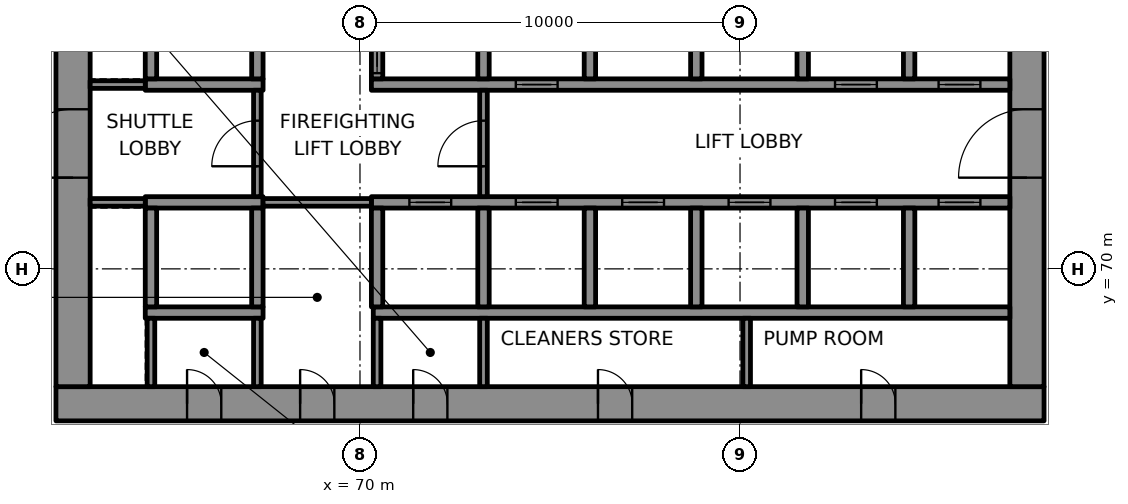
"""IFC4 building model, lengths in metres.
Left out: names, types, materials, properties, quantities, classifications, styles, units other than length and angle.
Written with IfcOpenShell. Run it as: python <this file> out.ifc"""

import sys

from ifc_helpers import new_model, si_unit, direction, frame, frame_2d, origin, place, context, subcontext, project, spatial, rectangle, extrude, element, fill, save


model = new_model("IFC4")
c1 = context("Model", 3, precision=1e-05, world=origin(), true_north=direction((0.0, 1.0)))
c2 = subcontext(c1, "Body", "Model", "MODEL_VIEW")
j1 = project(units=[si_unit("LENGTHUNIT", "METRE"), si_unit("PLANEANGLEUNIT", "RADIAN")], contexts=[c1])
p1 = place(None, origin())
s1 = spatial("IfcSite", under=j1, at=p1, CompositionType="ELEMENT")
p2 = place(p1, origin())
s2 = spatial("IfcBuilding", under=s1, at=p2, CompositionType="ELEMENT")
p3 = place(p2, frame((0.0, 0.0, 90.4)))
s3 = spatial("IfcBuildingStorey", under=s2, at=p3, CompositionType="ELEMENT", Elevation=90.4)
p4 = place(p3, frame((62.0, 66.45, 0.0), z_axis=(0.0, 0.0, 1.0), x_axis=(1.0, 0.0, 0.0)))
e1 = element("IfcWall", 1, at=p4, inside=s3, PredefinedType="SHEAR", context=c2, shape_type="SweptSolid", body=[
    extrude(rectangle(XDim=26.0, YDim=0.9, at=frame_2d((13.0, 0.0))), origin(), (0.0, 0.0, 1.0), 4.0),
])
p5 = place(p4, frame((3.45, 0.0, 0.0)))
e2 = element("IfcOpeningElement", 2, at=p5, cuts=e1, PredefinedType="OPENING", context=c2, shape_type="SweptSolid", body=[
    extrude(rectangle(XDim=0.9, YDim=2.1, at=frame_2d((0.45, 1.05))), frame((0.0, 0.46, 0.0), z_axis=(0.0, -1.0, 0.0), x_axis=(1.0, 0.0, 0.0)), (0.0, 0.0, 1.0), 0.92),
])
p6 = place(p4, frame((6.425, 0.0, 0.0)))
e3 = element("IfcOpeningElement", 3, at=p6, cuts=e1, PredefinedType="OPENING", context=c2, shape_type="SweptSolid", body=[
    extrude(rectangle(XDim=0.9, YDim=2.1, at=frame_2d((0.45, 1.05))), frame((0.0, 0.46, 0.0), z_axis=(0.0, -1.0, 0.0), x_axis=(1.0, 0.0, 0.0)), (0.0, 0.0, 1.0), 0.92),
])
p7 = place(p4, frame((9.4, 0.0, 0.0)))
e4 = element("IfcOpeningElement", 4, at=p7, cuts=e1, PredefinedType="OPENING", context=c2, shape_type="SweptSolid", body=[
    extrude(rectangle(XDim=0.9, YDim=2.1, at=frame_2d((0.45, 1.05))), frame((0.0, 0.46, 0.0), z_axis=(0.0, -1.0, 0.0), x_axis=(1.0, 0.0, 0.0)), (0.0, 0.0, 1.0), 0.92),
])
p8 = place(p4, frame((14.262, 0.0, 0.0)))
e5 = element("IfcOpeningElement", 5, at=p8, cuts=e1, PredefinedType="OPENING", context=c2, shape_type="SweptSolid", body=[
    extrude(rectangle(XDim=0.9, YDim=2.1, at=frame_2d((0.45, 1.05))), frame((0.0, 0.46, 0.0), z_axis=(0.0, -1.0, 0.0), x_axis=(1.0, 0.0, 0.0)), (0.0, 0.0, 1.0), 0.92),
])
p9 = place(p4, frame((21.188, 0.0, 0.0)))
e6 = element("IfcOpeningElement", 6, at=p9, cuts=e1, PredefinedType="OPENING", context=c2, shape_type="SweptSolid", body=[
    extrude(rectangle(XDim=0.9, YDim=2.1, at=frame_2d((0.45, 1.05))), frame((0.0, 0.46, 0.0), z_axis=(0.0, -1.0, 0.0), x_axis=(1.0, 0.0, 0.0)), (0.0, 0.0, 1.0), 0.92),
])
p10 = place(p3, frame((62.45, 66.9, 0.0), z_axis=(0.0, 0.0, 1.0), x_axis=(0.0, 1.0, 0.0)))
e7 = element("IfcWall", 7, at=p10, inside=s3, PredefinedType="SHEAR", context=c2, shape_type="SweptSolid", body=[
    extrude(rectangle(XDim=16.2, YDim=0.9, at=frame_2d((8.1, 0.0))), origin(), (0.0, 0.0, 1.0), 4.0),
])
p11 = place(p10, frame((5.5, 0.0, 0.0)))
e8 = element("IfcOpeningElement", 8, at=p11, cuts=e7, PredefinedType="OPENING", context=c2, shape_type="SweptSolid", body=[
    extrude(rectangle(XDim=1.8, YDim=2.1, at=frame_2d((0.9, 1.05))), frame((0.0, 0.46, 0.0), z_axis=(0.0, -1.0, 0.0), x_axis=(1.0, 0.0, 0.0)), (0.0, 0.0, 1.0), 0.92),
])
p12 = place(p3, frame((87.55, 66.9, 0.0), z_axis=(0.0, 0.0, 1.0), x_axis=(0.0, 1.0, 0.0)))
e9 = element("IfcWall", 9, at=p12, inside=s3, PredefinedType="SHEAR", context=c2, shape_type="SweptSolid", body=[
    extrude(rectangle(XDim=16.2, YDim=0.9, at=frame_2d((8.1, 0.0))), origin(), (0.0, 0.0, 1.0), 4.0),
])
p13 = place(p12, frame((5.5, 0.0, 0.0)))
e10 = element("IfcOpeningElement", 10, at=p13, cuts=e9, PredefinedType="OPENING", context=c2, shape_type="SweptSolid", body=[
    extrude(rectangle(XDim=1.8, YDim=2.1, at=frame_2d((0.9, 1.05))), frame((0.0, 0.46, 0.0), z_axis=(0.0, -1.0, 0.0), x_axis=(1.0, 0.0, 0.0)), (0.0, 0.0, 1.0), 0.92),
])
p14 = place(p12, frame((11.738, 0.0, 0.0)))
e11 = element("IfcOpeningElement", 11, at=p14, cuts=e9, PredefinedType="OPENING", context=c2, shape_type="SweptSolid", body=[
    extrude(rectangle(XDim=0.9, YDim=2.1, at=frame_2d((0.45, 1.05))), frame((0.0, 0.46, 0.0), z_axis=(0.0, -1.0, 0.0), x_axis=(1.0, 0.0, 0.0)), (0.0, 0.0, 1.0), 0.92),
])
p15 = place(p3, frame((64.35, 68.85, 0.0), z_axis=(0.0, 0.0, 1.0), x_axis=(1.0, 0.0, 0.0)))
e12 = element("IfcWall", 12, at=p15, inside=s3, PredefinedType="SHEAR", context=c2, shape_type="SweptSolid", body=[
    extrude(rectangle(XDim=3.1, YDim=0.3, at=frame_2d((1.55, 0.0))), origin(), (0.0, 0.0, 1.0), 4.0),
])
p16 = place(p3, frame((70.35, 68.85, 0.0), z_axis=(0.0, 0.0, 1.0), x_axis=(1.0, 0.0, 0.0)))
e13 = element("IfcWall", 13, at=p16, inside=s3, PredefinedType="SHEAR", context=c2, shape_type="SweptSolid", body=[
    extrude(rectangle(XDim=16.75, YDim=0.3, at=frame_2d((8.375, 0.0))), origin(), (0.0, 0.0, 1.0), 4.0),
])
p17 = place(p3, frame((64.35, 71.75, 0.0), z_axis=(0.0, 0.0, 1.0), x_axis=(1.0, 0.0, 0.0)))
e14 = element("IfcWall", 14, at=p17, inside=s3, PredefinedType="SHEAR", context=c2, shape_type="SweptSolid", body=[
    extrude(rectangle(XDim=3.1, YDim=0.3, at=frame_2d((1.55, 0.0))), origin(), (0.0, 0.0, 1.0), 4.0),
])
p18 = place(p3, frame((70.3, 71.75, 0.0), z_axis=(0.0, 0.0, 1.0), x_axis=(1.0, 0.0, 0.0)))
e15 = element("IfcWall", 15, at=p18, inside=s3, PredefinedType="SHEAR", context=c2, shape_type="SweptSolid", body=[
    extrude(rectangle(XDim=16.8, YDim=0.3, at=frame_2d((8.4, 0.0))), origin(), (0.0, 0.0, 1.0), 4.0),
])
p19 = place(p18, frame((1.0, 0.0, 0.0)))
e16 = element("IfcOpeningElement", 16, at=p19, cuts=e15, PredefinedType="OPENING", context=c2, shape_type="SweptSolid", body=[
    extrude(rectangle(XDim=1.1, YDim=2.1, at=frame_2d((0.55, 1.05))), frame((0.0, 0.16, 0.0), z_axis=(0.0, -1.0, 0.0), x_axis=(1.0, 0.0, 0.0)), (0.0, 0.0, 1.0), 0.32),
])
p20 = place(p18, frame((3.8, 0.0, 0.0)))
e17 = element("IfcOpeningElement", 17, at=p20, cuts=e15, PredefinedType="OPENING", context=c2, shape_type="SweptSolid", body=[
    extrude(rectangle(XDim=1.1, YDim=2.1, at=frame_2d((0.55, 1.05))), frame((0.0, 0.16, 0.0), z_axis=(0.0, -1.0, 0.0), x_axis=(1.0, 0.0, 0.0)), (0.0, 0.0, 1.0), 0.32),
])
p21 = place(p18, frame((6.6, 0.0, 0.0)))
e18 = element("IfcOpeningElement", 18, at=p21, cuts=e15, PredefinedType="OPENING", context=c2, shape_type="SweptSolid", body=[
    extrude(rectangle(XDim=1.1, YDim=2.1, at=frame_2d((0.55, 1.05))), frame((0.0, 0.16, 0.0), z_axis=(0.0, -1.0, 0.0), x_axis=(1.0, 0.0, 0.0)), (0.0, 0.0, 1.0), 0.32),
])
p22 = place(p18, frame((9.4, 0.0, 0.0)))
e19 = element("IfcOpeningElement", 19, at=p22, cuts=e15, PredefinedType="OPENING", context=c2, shape_type="SweptSolid", body=[
    extrude(rectangle(XDim=1.1, YDim=2.1, at=frame_2d((0.55, 1.05))), frame((0.0, 0.16, 0.0), z_axis=(0.0, -1.0, 0.0), x_axis=(1.0, 0.0, 0.0)), (0.0, 0.0, 1.0), 0.32),
])
p23 = place(p18, frame((12.2, 0.0, 0.0)))
e20 = element("IfcOpeningElement", 20, at=p23, cuts=e15, PredefinedType="OPENING", context=c2, shape_type="SweptSolid", body=[
    extrude(rectangle(XDim=1.1, YDim=2.1, at=frame_2d((0.55, 1.05))), frame((0.0, 0.16, 0.0), z_axis=(0.0, -1.0, 0.0), x_axis=(1.0, 0.0, 0.0)), (0.0, 0.0, 1.0), 0.32),
])
p24 = place(p18, frame((14.925, 0.0, 0.0)))
e21 = element("IfcOpeningElement", 21, at=p24, cuts=e15, PredefinedType="OPENING", context=c2, shape_type="SweptSolid", body=[
    extrude(rectangle(XDim=1.1, YDim=2.1, at=frame_2d((0.55, 1.05))), frame((0.0, 0.16, 0.0), z_axis=(0.0, -1.0, 0.0), x_axis=(1.0, 0.0, 0.0)), (0.0, 0.0, 1.0), 0.32),
])
p25 = place(p3, frame((64.35, 74.85, 0.0), z_axis=(0.0, 0.0, 1.0), x_axis=(1.0, 0.0, 0.0)))
e22 = element("IfcWall", 22, at=p25, inside=s3, PredefinedType="SHEAR", context=c2, shape_type="SweptSolid", body=[
    extrude(rectangle(XDim=3.1, YDim=0.3, at=frame_2d((1.55, 0.0))), origin(), (0.0, 0.0, 1.0), 4.0),
])
p26 = place(p3, frame((70.3, 74.85, 0.0), z_axis=(0.0, 0.0, 1.0), x_axis=(1.0, 0.0, 0.0)))
e23 = element("IfcWall", 23, at=p26, inside=s3, PredefinedType="SHEAR", context=c2, shape_type="SweptSolid", body=[
    extrude(rectangle(XDim=16.8, YDim=0.3, at=frame_2d((8.4, 0.0))), origin(), (0.0, 0.0, 1.0), 4.0),
])
p27 = place(p26, frame((3.8, 0.0, 0.0)))
e24 = element("IfcOpeningElement", 24, at=p27, cuts=e23, PredefinedType="OPENING", context=c2, shape_type="SweptSolid", body=[
    extrude(rectangle(XDim=1.1, YDim=2.1, at=frame_2d((0.55, 1.05))), frame((0.0, 0.16, 0.0), z_axis=(0.0, -1.0, 0.0), x_axis=(1.0, 0.0, 0.0)), (0.0, 0.0, 1.0), 0.32),
])
p28 = place(p26, frame((12.2, 0.0, 0.0)))
e25 = element("IfcOpeningElement", 25, at=p28, cuts=e23, PredefinedType="OPENING", context=c2, shape_type="SweptSolid", body=[
    extrude(rectangle(XDim=1.1, YDim=2.1, at=frame_2d((0.55, 1.05))), frame((0.0, 0.16, 0.0), z_axis=(0.0, -1.0, 0.0), x_axis=(1.0, 0.0, 0.0)), (0.0, 0.0, 1.0), 0.32),
])
p29 = place(p26, frame((14.925, 0.0, 0.0)))
e26 = element("IfcOpeningElement", 26, at=p29, cuts=e23, PredefinedType="OPENING", context=c2, shape_type="SweptSolid", body=[
    extrude(rectangle(XDim=1.1, YDim=2.1, at=frame_2d((0.55, 1.05))), frame((0.0, 0.16, 0.0), z_axis=(0.0, -1.0, 0.0), x_axis=(1.0, 0.0, 0.0)), (0.0, 0.0, 1.0), 0.32),
])
for number, where, z_axis, x_axis in (
    (27, (64.5, 69.0, 0.0), (0.0, 0.0, 1.0), (0.0, 1.0, 0.0)),
    (28, (64.5, 75.0, 0.0), (0.0, 0.0, 1.0), (0.0, 1.0, 0.0)),
    (29, (67.3, 69.0, 0.0), (0.0, 0.0, 1.0), (0.0, 1.0, 0.0)),
    (30, (67.3, 75.0, 0.0), (0.0, 0.0, 1.0), (0.0, 1.0, 0.0)),
    (31, (70.45, 69.0, 0.0), (0.0, 0.0, 1.0), (0.0, 1.0, 0.0)),
):
    element("IfcWall", number, at=place(p3, frame(where, z_axis=z_axis, x_axis=x_axis)), inside=s3, PredefinedType="SHEAR", context=c2, shape_type="SweptSolid", body=[
        extrude(rectangle(XDim=2.6, YDim=0.3, at=frame_2d((1.3, 0.0))), origin(), (0.0, 0.0, 1.0), 4.0),
    ])
p30 = place(p3, frame((70.45, 75.0, 0.0), z_axis=(0.0, 0.0, 1.0), x_axis=(0.0, 1.0, 0.0)))
e32 = element("IfcWall", 32, at=p30, inside=s3, PredefinedType="SHEAR", context=c2, shape_type="SweptSolid", body=[
    extrude(rectangle(XDim=2.6, YDim=0.3, at=frame_2d((1.3, 0.0))), origin(), (0.0, 0.0, 1.0), 4.0),
])
p31 = place(p30, frame((0.15, 0.0, 0.0)))
e33 = element("IfcOpeningElement", 33, at=p31, cuts=e32, PredefinedType="OPENING", context=c2, shape_type="SweptSolid", body=[
    extrude(rectangle(XDim=1.1, YDim=2.1, at=frame_2d((0.55, 1.05))), frame((0.0, 0.16, 0.0), z_axis=(0.0, -1.0, 0.0), x_axis=(1.0, 0.0, 0.0)), (0.0, 0.0, 1.0), 0.32),
])
for number, where, z_axis, x_axis in (
    (34, (73.25, 69.0, 0.0), (0.0, 0.0, 1.0), (0.0, 1.0, 0.0)),
    (35, (73.25, 75.0, 0.0), (0.0, 0.0, 1.0), (0.0, 1.0, 0.0)),
    (36, (76.05, 69.0, 0.0), (0.0, 0.0, 1.0), (0.0, 1.0, 0.0)),
    (37, (76.05, 75.0, 0.0), (0.0, 0.0, 1.0), (0.0, 1.0, 0.0)),
    (38, (78.85, 69.0, 0.0), (0.0, 0.0, 1.0), (0.0, 1.0, 0.0)),
    (39, (78.85, 75.0, 0.0), (0.0, 0.0, 1.0), (0.0, 1.0, 0.0)),
    (40, (81.65, 69.0, 0.0), (0.0, 0.0, 1.0), (0.0, 1.0, 0.0)),
    (41, (81.65, 75.0, 0.0), (0.0, 0.0, 1.0), (0.0, 1.0, 0.0)),
    (42, (84.45, 69.0, 0.0), (0.0, 0.0, 1.0), (0.0, 1.0, 0.0)),
    (43, (84.45, 75.0, 0.0), (0.0, 0.0, 1.0), (0.0, 1.0, 0.0)),
):
    element("IfcWall", number, at=place(p3, frame(where, z_axis=z_axis, x_axis=x_axis)), inside=s3, PredefinedType="SHEAR", context=c2, shape_type="SweptSolid", body=[
        extrude(rectangle(XDim=2.6, YDim=0.3, at=frame_2d((1.3, 0.0))), origin(), (0.0, 0.0, 1.0), 4.0),
    ])
p32 = place(p3, frame((62.9, 71.75, 0.0), z_axis=(0.0, 0.0, 1.0), x_axis=(1.0, 0.0, 0.0)))
e44 = element("IfcWall", 44, at=p32, inside=s3, PredefinedType="PARTITIONING", context=c2, shape_type="SweptSolid", body=[
    extrude(rectangle(XDim=1.45, YDim=0.2, at=frame_2d((0.725, 0.0))), origin(), (0.0, 0.0, 1.0), 4.0),
])
p33 = place(p3, frame((67.45, 71.75, 0.0), z_axis=(0.0, 0.0, 1.0), x_axis=(1.0, 0.0, 0.0)))
e45 = element("IfcWall", 45, at=p33, inside=s3, PredefinedType="PARTITIONING", context=c2, shape_type="SweptSolid", body=[
    extrude(rectangle(XDim=2.85, YDim=0.2, at=frame_2d((1.425, 0.0))), origin(), (0.0, 0.0, 1.0), 4.0),
])
p34 = place(p3, frame((62.9, 74.85, 0.0), z_axis=(0.0, 0.0, 1.0), x_axis=(1.0, 0.0, 0.0)))
e46 = element("IfcWall", 46, at=p34, inside=s3, PredefinedType="PARTITIONING", context=c2, shape_type="SweptSolid", body=[
    extrude(rectangle(XDim=1.45, YDim=0.2, at=frame_2d((0.725, 0.0))), origin(), (0.0, 0.0, 1.0), 4.0),
])
for number, where, z_axis, x_axis in (
    (47, (64.5, 66.9, 0.0), (0.0, 0.0, 1.0), (0.0, 1.0, 0.0)),
    (48, (67.3, 66.9, 0.0), (0.0, 0.0, 1.0), (0.0, 1.0, 0.0)),
):
    element("IfcWall", number, at=place(p3, frame(where, z_axis=z_axis, x_axis=x_axis)), inside=s3, PredefinedType="PARTITIONING", context=c2, shape_type="SweptSolid", body=[
        extrude(rectangle(XDim=1.8, YDim=0.2, at=frame_2d((0.9, 0.0))), origin(), (0.0, 0.0, 1.0), 4.0),
    ])
p35 = place(p3, frame((67.3, 71.9, 0.0), z_axis=(0.0, 0.0, 1.0), x_axis=(0.0, 1.0, 0.0)))
e49 = element("IfcWall", 49, at=p35, inside=s3, PredefinedType="PARTITIONING", context=c2, shape_type="SweptSolid", body=[
    extrude(rectangle(XDim=2.8, YDim=0.2, at=frame_2d((1.4, 0.0))), origin(), (0.0, 0.0, 1.0), 4.0),
])
p36 = place(p35, frame((0.8, 0.0, 0.0)))
e50 = element("IfcOpeningElement", 50, at=p36, cuts=e49, PredefinedType="OPENING", context=c2, shape_type="SweptSolid", body=[
    extrude(rectangle(XDim=1.2, YDim=2.1, at=frame_2d((0.6, 1.05))), frame((0.0, 0.11, 0.0), z_axis=(0.0, -1.0, 0.0), x_axis=(1.0, 0.0, 0.0)), (0.0, 0.0, 1.0), 0.22),
])
for number, where, z_axis, x_axis in (
    (51, (70.45, 66.9, 0.0), (0.0, 0.0, 1.0), (0.0, 1.0, 0.0)),
    (52, (73.25, 66.9, 0.0), (0.0, 0.0, 1.0), (0.0, 1.0, 0.0)),
):
    element("IfcWall", number, at=place(p3, frame(where, z_axis=z_axis, x_axis=x_axis)), inside=s3, PredefinedType="PARTITIONING", context=c2, shape_type="SweptSolid", body=[
        extrude(rectangle(XDim=1.8, YDim=0.2, at=frame_2d((0.9, 0.0))), origin(), (0.0, 0.0, 1.0), 4.0),
    ])
p37 = place(p3, frame((73.25, 71.9, 0.0), z_axis=(0.0, 0.0, 1.0), x_axis=(0.0, 1.0, 0.0)))
e53 = element("IfcWall", 53, at=p37, inside=s3, PredefinedType="PARTITIONING", context=c2, shape_type="SweptSolid", body=[
    extrude(rectangle(XDim=2.8, YDim=0.2, at=frame_2d((1.4, 0.0))), origin(), (0.0, 0.0, 1.0), 4.0),
])
p38 = place(p37, frame((0.8, 0.0, 0.0)))
e54 = element("IfcOpeningElement", 54, at=p38, cuts=e53, PredefinedType="OPENING", context=c2, shape_type="SweptSolid", body=[
    extrude(rectangle(XDim=1.2, YDim=2.1, at=frame_2d((0.6, 1.05))), frame((0.0, 0.11, 0.0), z_axis=(0.0, -1.0, 0.0), x_axis=(1.0, 0.0, 0.0)), (0.0, 0.0, 1.0), 0.22),
])
p39 = place(p3, frame((80.175, 66.9, 0.0), z_axis=(0.0, 0.0, 1.0), x_axis=(0.0, 1.0, 0.0)))
e55 = element("IfcWall", 55, at=p39, inside=s3, PredefinedType="PARTITIONING", context=c2, shape_type="SweptSolid", body=[
    extrude(rectangle(XDim=1.8, YDim=0.2, at=frame_2d((0.9, 0.0))), origin(), (0.0, 0.0, 1.0), 4.0),
])
p40 = place(p19, origin())
e56 = element("IfcDoor", 56, at=p40, inside=s3, OperationType="DOUBLE_DOOR_SLIDING", PredefinedType="DOOR", context=c2, shape_type="SweptSolid", body=[
    extrude(rectangle(XDim=1.1, YDim=2.1, at=frame_2d((0.55, 1.05))), frame((0.0, 0.025, 0.0), z_axis=(0.0, -1.0, 0.0), x_axis=(1.0, 0.0, 0.0)), (0.0, 0.0, 1.0), 0.05),
])
fill(e16, e56)
p41 = place(p20, origin())
e57 = element("IfcDoor", 57, at=p41, inside=s3, OperationType="DOUBLE_DOOR_SLIDING", PredefinedType="DOOR", context=c2, shape_type="SweptSolid", body=[
    extrude(rectangle(XDim=1.1, YDim=2.1, at=frame_2d((0.55, 1.05))), frame((0.0, 0.025, 0.0), z_axis=(0.0, -1.0, 0.0), x_axis=(1.0, 0.0, 0.0)), (0.0, 0.0, 1.0), 0.05),
])
fill(e17, e57)
p42 = place(p21, origin())
e58 = element("IfcDoor", 58, at=p42, inside=s3, OperationType="DOUBLE_DOOR_SLIDING", PredefinedType="DOOR", context=c2, shape_type="SweptSolid", body=[
    extrude(rectangle(XDim=1.1, YDim=2.1, at=frame_2d((0.55, 1.05))), frame((0.0, 0.025, 0.0), z_axis=(0.0, -1.0, 0.0), x_axis=(1.0, 0.0, 0.0)), (0.0, 0.0, 1.0), 0.05),
])
fill(e18, e58)
p43 = place(p22, origin())
e59 = element("IfcDoor", 59, at=p43, inside=s3, OperationType="DOUBLE_DOOR_SLIDING", PredefinedType="DOOR", context=c2, shape_type="SweptSolid", body=[
    extrude(rectangle(XDim=1.1, YDim=2.1, at=frame_2d((0.55, 1.05))), frame((0.0, 0.025, 0.0), z_axis=(0.0, -1.0, 0.0), x_axis=(1.0, 0.0, 0.0)), (0.0, 0.0, 1.0), 0.05),
])
fill(e19, e59)
p44 = place(p23, origin())
e60 = element("IfcDoor", 60, at=p44, inside=s3, OperationType="DOUBLE_DOOR_SLIDING", PredefinedType="DOOR", context=c2, shape_type="SweptSolid", body=[
    extrude(rectangle(XDim=1.1, YDim=2.1, at=frame_2d((0.55, 1.05))), frame((0.0, 0.025, 0.0), z_axis=(0.0, -1.0, 0.0), x_axis=(1.0, 0.0, 0.0)), (0.0, 0.0, 1.0), 0.05),
])
fill(e20, e60)
p45 = place(p24, origin())
e61 = element("IfcDoor", 61, at=p45, inside=s3, OperationType="DOUBLE_DOOR_SLIDING", PredefinedType="DOOR", context=c2, shape_type="SweptSolid", body=[
    extrude(rectangle(XDim=1.1, YDim=2.1, at=frame_2d((0.55, 1.05))), frame((0.0, 0.025, 0.0), z_axis=(0.0, -1.0, 0.0), x_axis=(1.0, 0.0, 0.0)), (0.0, 0.0, 1.0), 0.05),
])
fill(e21, e61)
p46 = place(p31, origin())
e62 = element("IfcDoor", 62, at=p46, inside=s3, OperationType="DOUBLE_DOOR_SLIDING", PredefinedType="DOOR", context=c2, shape_type="SweptSolid", body=[
    extrude(rectangle(XDim=1.1, YDim=2.1, at=frame_2d((0.55, 1.05))), frame((0.0, 0.025, 0.0), z_axis=(0.0, -1.0, 0.0), x_axis=(1.0, 0.0, 0.0)), (0.0, 0.0, 1.0), 0.05),
])
fill(e33, e62)
p47 = place(p27, origin())
e63 = element("IfcDoor", 63, at=p47, inside=s3, OperationType="DOUBLE_DOOR_SLIDING", PredefinedType="DOOR", context=c2, shape_type="SweptSolid", body=[
    extrude(rectangle(XDim=1.1, YDim=2.1, at=frame_2d((0.55, 1.05))), frame((0.0, 0.025, 0.0), z_axis=(0.0, -1.0, 0.0), x_axis=(1.0, 0.0, 0.0)), (0.0, 0.0, 1.0), 0.05),
])
fill(e24, e63)
p48 = place(p28, origin())
e64 = element("IfcDoor", 64, at=p48, inside=s3, OperationType="DOUBLE_DOOR_SLIDING", PredefinedType="DOOR", context=c2, shape_type="SweptSolid", body=[
    extrude(rectangle(XDim=1.1, YDim=2.1, at=frame_2d((0.55, 1.05))), frame((0.0, 0.025, 0.0), z_axis=(0.0, -1.0, 0.0), x_axis=(1.0, 0.0, 0.0)), (0.0, 0.0, 1.0), 0.05),
])
fill(e25, e64)
p49 = place(p29, origin())
e65 = element("IfcDoor", 65, at=p49, inside=s3, OperationType="DOUBLE_DOOR_SLIDING", PredefinedType="DOOR", context=c2, shape_type="SweptSolid", body=[
    extrude(rectangle(XDim=1.1, YDim=2.1, at=frame_2d((0.55, 1.05))), frame((0.0, 0.025, 0.0), z_axis=(0.0, -1.0, 0.0), x_axis=(1.0, 0.0, 0.0)), (0.0, 0.0, 1.0), 0.05),
])
fill(e26, e65)
p50 = place(p38, origin())
e66 = element("IfcDoor", 66, at=p50, inside=s3, OperationType="SINGLE_SWING_LEFT", PredefinedType="DOOR", context=c2, shape_type="SweptSolid", body=[
    extrude(rectangle(XDim=1.2, YDim=2.1, at=frame_2d((0.6, 1.05))), frame((0.0, 0.025, 0.0), z_axis=(0.0, -1.0, 0.0), x_axis=(1.0, 0.0, 0.0)), (0.0, 0.0, 1.0), 0.05),
])
fill(e54, e66)
p51 = place(p36, origin())
e67 = element("IfcDoor", 67, at=p51, inside=s3, OperationType="SINGLE_SWING_RIGHT", PredefinedType="DOOR", context=c2, shape_type="SweptSolid", body=[
    extrude(rectangle(XDim=1.2, YDim=2.1, at=frame_2d((0.6, 1.05))), frame((0.0, 0.025, 0.0), z_axis=(0.0, -1.0, 0.0), x_axis=(1.0, 0.0, 0.0)), (0.0, 0.0, 1.0), 0.05),
])
fill(e50, e67)
p52 = place(p11, origin())
e68 = element("IfcDoor", 68, at=p52, inside=s3, OperationType="SINGLE_SWING_LEFT", PredefinedType="DOOR", context=c2, shape_type="SweptSolid", body=[
    extrude(rectangle(XDim=1.8, YDim=2.1, at=frame_2d((0.9, 1.05))), frame((0.0, 0.17, 0.0), z_axis=(0.0, -1.0, 0.0), x_axis=(1.0, 0.0, 0.0)), (0.0, 0.0, 1.0), 0.34),
])
fill(e8, e68)
p53 = place(p13, origin())
e69 = element("IfcDoor", 69, at=p53, inside=s3, OperationType="SINGLE_SWING_RIGHT", PredefinedType="DOOR", context=c2, shape_type="SweptSolid", body=[
    extrude(rectangle(XDim=1.8, YDim=2.1, at=frame_2d((0.9, 1.05))), frame((0.0, 0.17, 0.0), z_axis=(0.0, -1.0, 0.0), x_axis=(1.0, 0.0, 0.0)), (0.0, 0.0, 1.0), 0.34),
])
fill(e10, e69)
p54 = place(p5, origin())
e70 = element("IfcDoor", 70, at=p54, inside=s3, OperationType="SINGLE_SWING_LEFT", PredefinedType="DOOR", context=c2, shape_type="SweptSolid", body=[
    extrude(rectangle(XDim=0.9, YDim=2.1, at=frame_2d((0.45, 1.05))), frame((0.0, 0.17, 0.0), z_axis=(0.0, -1.0, 0.0), x_axis=(1.0, 0.0, 0.0)), (0.0, 0.0, 1.0), 0.34),
])
fill(e2, e70)
p55 = place(p6, origin())
e71 = element("IfcDoor", 71, at=p55, inside=s3, OperationType="SINGLE_SWING_RIGHT", PredefinedType="DOOR", context=c2, shape_type="SweptSolid", body=[
    extrude(rectangle(XDim=0.9, YDim=2.1, at=frame_2d((0.45, 1.05))), frame((0.0, 0.17, 0.0), z_axis=(0.0, -1.0, 0.0), x_axis=(1.0, 0.0, 0.0)), (0.0, 0.0, 1.0), 0.34),
])
fill(e3, e71)
p56 = place(p7, origin())
e72 = element("IfcDoor", 72, at=p56, inside=s3, OperationType="SINGLE_SWING_LEFT", PredefinedType="DOOR", context=c2, shape_type="SweptSolid", body=[
    extrude(rectangle(XDim=0.9, YDim=2.1, at=frame_2d((0.45, 1.05))), frame((0.0, 0.17, 0.0), z_axis=(0.0, -1.0, 0.0), x_axis=(1.0, 0.0, 0.0)), (0.0, 0.0, 1.0), 0.34),
])
fill(e4, e72)
p57 = place(p8, origin())
e73 = element("IfcDoor", 73, at=p57, inside=s3, OperationType="SINGLE_SWING_RIGHT", PredefinedType="DOOR", context=c2, shape_type="SweptSolid", body=[
    extrude(rectangle(XDim=0.9, YDim=2.1, at=frame_2d((0.45, 1.05))), frame((0.0, 0.17, 0.0), z_axis=(0.0, -1.0, 0.0), x_axis=(1.0, 0.0, 0.0)), (0.0, 0.0, 1.0), 0.34),
])
fill(e5, e73)
p58 = place(p9, origin())
e74 = element("IfcDoor", 74, at=p58, inside=s3, OperationType="SINGLE_SWING_LEFT", PredefinedType="DOOR", context=c2, shape_type="SweptSolid", body=[
    extrude(rectangle(XDim=0.9, YDim=2.1, at=frame_2d((0.45, 1.05))), frame((0.0, 0.17, 0.0), z_axis=(0.0, -1.0, 0.0), x_axis=(1.0, 0.0, 0.0)), (0.0, 0.0, 1.0), 0.34),
])
fill(e6, e74)
save(model, sys.argv[1])
